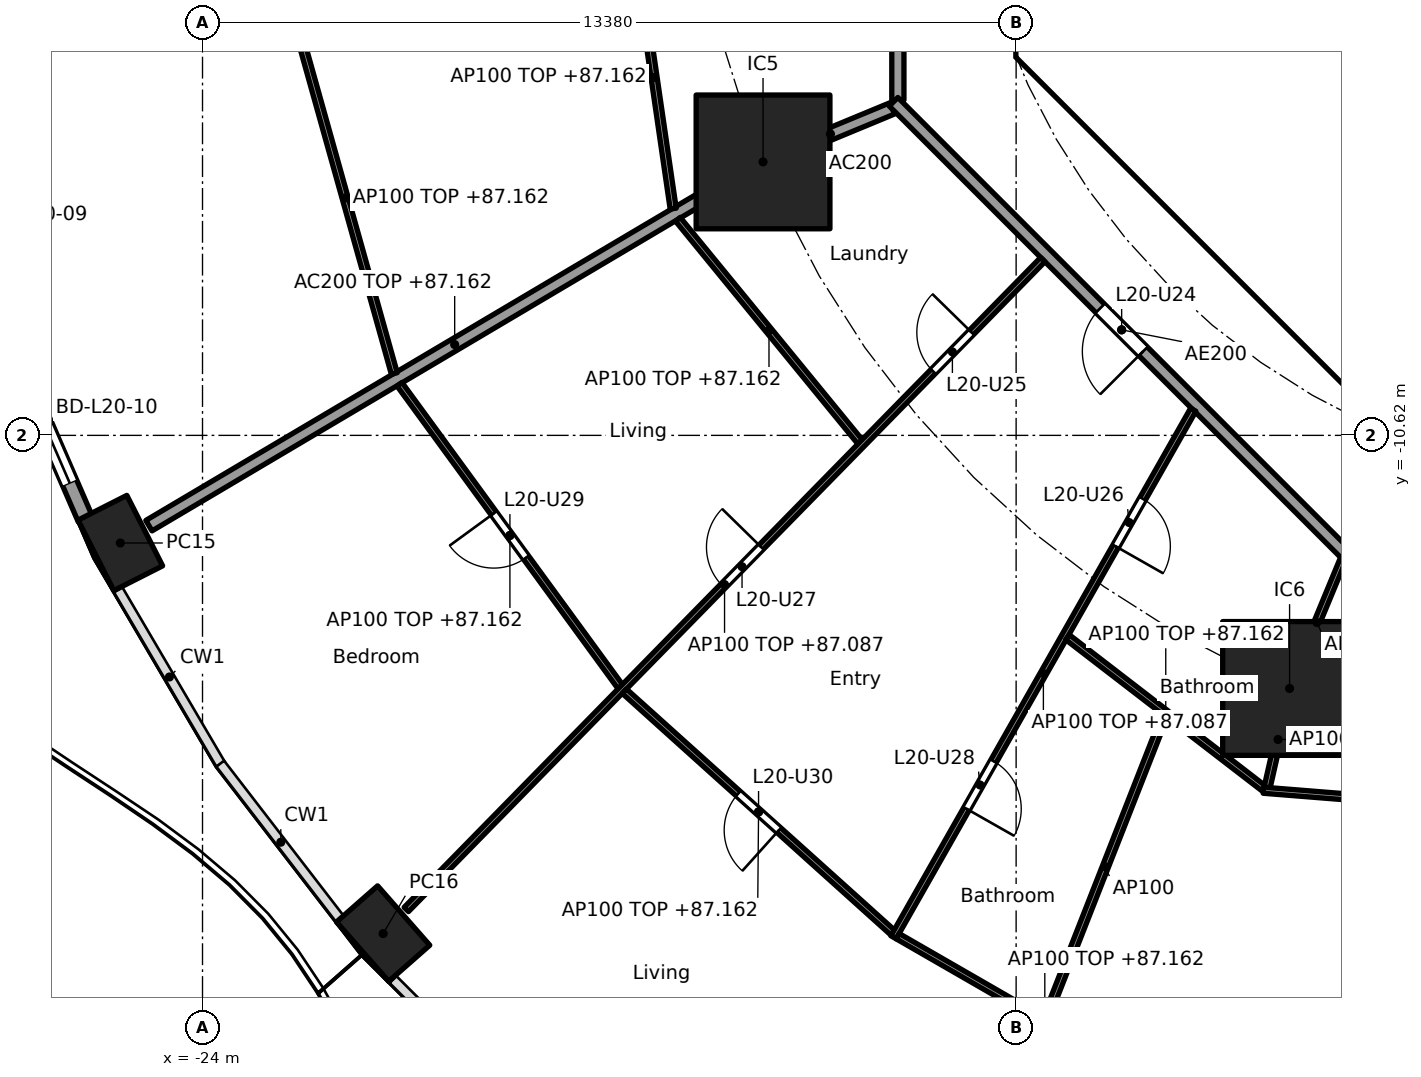
"""IFC4 building model, lengths in metres.
Left out: names, types, materials, properties, quantities, classifications, styles, units other than length and angle.
Written with IfcOpenShell. Run it as: python <this file> out.ifc"""

import sys

from ifc_helpers import new_model, si_unit, direction, frame, frame_2d, origin, origin_2d, place, context, subcontext, project, spatial, polyline, rectangle, hollow_rectangle, outline, extrude, element, fill, save


model = new_model("IFC4")
c1 = context("Model", 3, precision=1e-05, world=origin(), true_north=direction((0.0, 1.0)))
c2 = subcontext(c1, "Body", "Model", "MODEL_VIEW")
j1 = project(units=[si_unit("LENGTHUNIT", "METRE"), si_unit("PLANEANGLEUNIT", "RADIAN")], contexts=[c1])
p1 = place(None, origin())
s1 = spatial("IfcSite", under=j1, at=p1, CompositionType="ELEMENT")
p2 = place(p1, origin())
s2 = spatial("IfcBuilding", under=s1, at=p2, CompositionType="ELEMENT")
p3 = place(p2, frame((0.0, 0.0, 84.4)))
s3 = spatial("IfcBuildingStorey", under=s2, at=p3, CompositionType="ELEMENT", Elevation=84.4)
for number, where, z_axis, x_axis in (
    (1, (-25.352, -12.39, 0.0), (0.0, 0.0, 1.0), (0.452, -0.892, 0.0)),
    (2, (-21.03, -18.813, 0.0), (0.0, 0.0, 1.0), (0.66, -0.751, 0.0)),
):
    element("IfcColumn", number, at=place(p3, frame(where, z_axis=z_axis, x_axis=x_axis)), inside=s3, PredefinedType="COLUMN", context=c2, shape_type="SweptSolid", body=[
        extrude(hollow_rectangle(XDim=1.3, YDim=0.9, WallThickness=0.045, at=origin_2d()), origin(), (0.0, 0.0, 1.0), 3.7),
    ])
for number, where, z_axis, x_axis in (
    (3, (-14.782, -6.123, 0.0), (0.0, 0.0, 1.0), (1.0, 0.0, 0.0)),
    (4, (-6.123, -14.782, 0.0), (0.0, 0.0, 1.0), (1.0, 0.0, 0.0)),
):
    element("IfcColumn", number, at=place(p3, frame(where, z_axis=z_axis, x_axis=x_axis)), inside=s3, PredefinedType="COLUMN", context=c2, shape_type="SweptSolid", body=[
        extrude(rectangle(XDim=2.2, YDim=2.2, at=origin_2d()), origin(), (0.0, 0.0, 1.0), 3.7),
    ])
p4 = place(p3, frame((-25.928, -11.994, 0.0), z_axis=(0.0, 0.0, 1.0), x_axis=(-0.397682447205, 0.917523117521, 0.0)))
e5 = element("IfcWall", 5, at=p4, inside=s3, PredefinedType="SOLIDWALL", context=c2, shape_type="SweptSolid", body=[
    extrude(rectangle(XDim=3.38, YDim=0.25, at=frame_2d((1.69, 0.0))), origin(), (0.0, 0.0, 1.0), 3.44),
])
p5 = place(p4, frame((0.64, 0.0, 0.0)))
e6 = element("IfcOpeningElement", 6, at=p5, cuts=e5, PredefinedType="OPENING", context=c2, shape_type="SweptSolid", body=[
    extrude(rectangle(XDim=2.1, YDim=2.4, at=frame_2d((1.05, 1.2))), frame((0.0, 0.135, 0.0), z_axis=(0.0, -1.0, 0.0), x_axis=(1.0, 0.0, 0.0)), (0.0, 0.0, 1.0), 0.27),
])
p6 = place(p3, frame((-9.988, -4.613, 0.0), z_axis=(0.0, 0.0, 1.0), x_axis=(0.707106781187, -0.707106781187, 0.0)))
e7 = element("IfcWall", 7, at=p6, inside=s3, PredefinedType="SHEAR", context=c2, shape_type="SweptSolid", body=[
    extrude(rectangle(XDim=7.602, YDim=0.6, at=frame_2d((3.801, 0.0))), origin(), (0.0, 0.0, 1.0), 3.44),
])
p7 = place(p6, frame((6.151, 0.0, 0.0)))
e8 = element("IfcOpeningElement", 8, at=p7, cuts=e7, PredefinedType="OPENING", context=c2, shape_type="SweptSolid", body=[
    extrude(rectangle(XDim=1.1, YDim=2.1, at=frame_2d((0.55, 1.05))), frame((0.0, 0.31, 0.0), z_axis=(0.0, -1.0, 0.0), x_axis=(1.0, 0.0, 0.0)), (0.0, 0.0, 1.0), 0.62),
])
p8 = place(p3, frame((-6.2, -7.827, 0.0), z_axis=(0.0, 0.0, 1.0), x_axis=(0.0, 1.0, 0.0)))
e9 = element("IfcWall", 9, at=p8, inside=s3, PredefinedType="PARTITIONING", context=c2, shape_type="SweptSolid", body=[
    extrude(rectangle(XDim=3.527, YDim=0.15, at=frame_2d((1.763, 0.0))), origin(), (0.0, 0.0, 1.0), 3.44),
])
p9 = place(p8, frame((2.365, 0.0, 0.0)))
e10 = element("IfcOpeningElement", 10, at=p9, cuts=e9, PredefinedType="OPENING", context=c2, shape_type="SweptSolid", body=[
    extrude(rectangle(XDim=0.9, YDim=2.1, at=frame_2d((0.45, 1.05))), frame((0.0, 0.085, 0.0), z_axis=(0.0, -1.0, 0.0), x_axis=(1.0, 0.0, 0.0)), (0.0, 0.0, 1.0), 0.17),
])
p10 = place(p8, frame((0.489, 0.0, 0.0)))
e11 = element("IfcOpeningElement", 11, at=p10, cuts=e9, PredefinedType="OPENING", context=c2, shape_type="SweptSolid", body=[
    extrude(rectangle(XDim=0.9, YDim=2.1, at=frame_2d((0.45, 1.05))), frame((0.0, 0.085, 0.0), z_axis=(0.0, -1.0, 0.0), x_axis=(1.0, 0.0, 0.0)), (0.0, 0.0, 1.0), 0.17),
])
p11 = place(p3, origin())
e12 = element("IfcWall", 12, at=p11, inside=s3, PredefinedType="SHEAR", context=c2, shape_type="SweptSolid", body=[
    extrude(outline(polyline([(-10.625, -3.801), (-10.025, -3.801), (-10.025, -4.152), (-9.776, -4.401), (-10.2, -4.825), (-10.625, -4.401), (-10.625, -3.801)])), origin(), (0.0, 0.0, 1.0), 3.44),
])
p12 = place(p3, frame((-8.301, -5.8, 0.0), z_axis=(0.0, 0.0, 1.0), x_axis=(1.0, 0.0, 0.0)))
e13 = element("IfcWall", 13, at=p12, inside=s3, PredefinedType="PARTITIONING", context=c2, shape_type="SweptSolid", body=[
    extrude(rectangle(XDim=2.026, YDim=0.15, at=frame_2d((1.013, 0.0))), origin(), (0.0, 0.0, 1.0), 3.44),
])
p13 = place(p3, frame((-12.657, -5.243, 0.0), z_axis=(0.0, 0.0, 1.0), x_axis=(-0.923876145736, -0.382691608661, 0.0)))
e14 = element("IfcWall", 14, at=p13, inside=s3, PredefinedType="PARTITIONING", context=c2, shape_type="SweptSolid", body=[
    extrude(rectangle(XDim=2.2, YDim=0.2, at=frame_2d((1.1, 0.0))), origin(), (0.0, 0.0, 1.0), 3.44),
])
p14 = place(p3, frame((-14.825, -6.148, 0.0), z_axis=(0.0, 0.0, 1.0), x_axis=(-0.860400431487, -0.509618580408, 0.0)))
e15 = element("IfcWall", 15, at=p14, inside=s3, PredefinedType="PARTITIONING", context=c2, shape_type="SweptSolid", body=[
    extrude(rectangle(XDim=11.688, YDim=0.2, at=frame_2d((5.844, 0.0))), origin(), (0.0, 0.0, 1.0), 2.762),
])
p15 = place(p3, frame((-12.565, 5.304, 0.0), z_axis=(0.0, 0.0, 1.0), x_axis=(0.0, -1.0, 0.0)))
e16 = element("IfcWall", 16, at=p15, inside=s3, PredefinedType="PARTITIONING", context=c2, shape_type="SweptSolid", body=[
    extrude(rectangle(XDim=10.409, YDim=0.2, at=frame_2d((5.205, 0.0))), origin(), (0.0, 0.0, 1.0), 3.44),
])
p16 = place(p15, frame((3.07, 0.0, 0.0)))
e17 = element("IfcOpeningElement", 17, at=p16, cuts=e16, PredefinedType="OPENING", context=c2, shape_type="SweptSolid", body=[
    extrude(rectangle(XDim=1.0, YDim=2.1, at=frame_2d((0.5, 1.05))), frame((0.0, 0.11, 0.0), z_axis=(0.0, -1.0, 0.0), x_axis=(1.0, 0.0, 0.0)), (0.0, 0.0, 1.0), 0.22),
])
p17 = place(p3, frame((-12.635, -5.134, 0.0), z_axis=(0.0, 0.0, 1.0), x_axis=(0.707106781187, -0.707106781187, 0.0)))
e18 = element("IfcWall", 18, at=p17, inside=s3, PredefinedType="PARTITIONING", context=c2, shape_type="SweptSolid", body=[
    extrude(rectangle(XDim=10.609, YDim=0.2, at=frame_2d((5.305, 0.0))), origin(), (0.0, 0.0, 1.0), 3.44),
])
p18 = place(p17, frame((4.804, 0.0, 0.0)))
e19 = element("IfcOpeningElement", 19, at=p18, cuts=e18, PredefinedType="OPENING", context=c2, shape_type="SweptSolid", body=[
    extrude(rectangle(XDim=1.0, YDim=2.1, at=frame_2d((0.5, 1.05))), frame((0.0, 0.11, 0.0), z_axis=(0.0, -1.0, 0.0), x_axis=(1.0, 0.0, 0.0)), (0.0, 0.0, 1.0), 0.22),
])
p19 = place(p3, frame((-16.888, -2.577, 0.0), z_axis=(0.0, 0.0, 1.0), x_axis=(0.144228053649, -0.989544475272, 0.0)))
e20 = element("IfcWall", 20, at=p19, inside=s3, PredefinedType="PARTITIONING", context=c2, shape_type="SweptSolid", body=[
    extrude(rectangle(XDim=4.359, YDim=0.1, at=frame_2d((2.179, 0.0))), origin(), (0.0, 0.0, 1.0), 2.762),
])
p20 = place(p3, frame((-22.463, -3.832, 0.0), z_axis=(0.0, 0.0, 1.0), x_axis=(0.269805201578, -0.962914925215, 0.0)))
e21 = element("IfcWall", 21, at=p20, inside=s3, PredefinedType="PARTITIONING", context=c2, shape_type="SweptSolid", body=[
    extrude(rectangle(XDim=5.993, YDim=0.1, at=frame_2d((2.997, 0.0))), origin(), (0.0, 0.0, 1.0), 2.762),
])
p21 = place(p3, frame((-16.182, -7.067, 0.0), z_axis=(0.0, 0.0, 1.0), x_axis=(0.633400832951, -0.773823871962, 0.0)))
e22 = element("IfcWall", 22, at=p21, inside=s3, PredefinedType="PARTITIONING", context=c2, shape_type="SweptSolid", body=[
    extrude(rectangle(XDim=4.729, YDim=0.1, at=frame_2d((2.365, 0.0))), origin(), (0.0, 0.0, 1.0), 2.762),
])
p22 = place(p3, frame((-20.76, -9.779, 0.0), z_axis=(0.0, 0.0, 1.0), x_axis=(0.589597019189, -0.807697564045, 0.0)))
e23 = element("IfcWall", 23, at=p22, inside=s3, PredefinedType="PARTITIONING", context=c2, shape_type="SweptSolid", body=[
    extrude(rectangle(XDim=6.158, YDim=0.1, at=frame_2d((3.079, 0.0))), origin(), (0.0, 0.0, 1.0), 2.762),
])
p23 = place(p22, frame((2.629, 0.0, 0.0)))
e24 = element("IfcOpeningElement", 24, at=p23, cuts=e23, PredefinedType="OPENING", context=c2, shape_type="SweptSolid", body=[
    extrude(rectangle(XDim=0.9, YDim=2.1, at=frame_2d((0.45, 1.05))), frame((0.0, 0.06, 0.0), z_axis=(0.0, -1.0, 0.0), x_axis=(1.0, 0.0, 0.0)), (0.0, 0.0, 1.0), 0.12),
])
p24 = place(p3, frame((-10.181, -7.729, 0.0), z_axis=(0.0, 0.0, 1.0), x_axis=(-0.699708106083, -0.714428839201, 0.0)))
e25 = element("IfcWall", 25, at=p24, inside=s3, PredefinedType="PARTITIONING", context=c2, shape_type="SweptSolid", body=[
    extrude(rectangle(XDim=14.959, YDim=0.1, at=frame_2d((7.48, 0.0))), origin(), (0.0, 0.0, 1.0), 2.687),
])
p25 = place(p24, frame((1.675, 0.0, 0.0)))
e26 = element("IfcOpeningElement", 26, at=p25, cuts=e25, PredefinedType="OPENING", context=c2, shape_type="SweptSolid", body=[
    extrude(rectangle(XDim=0.9, YDim=2.1, at=frame_2d((0.45, 1.05))), frame((0.0, 0.06, 0.0), z_axis=(0.0, -1.0, 0.0), x_axis=(1.0, 0.0, 0.0)), (0.0, 0.0, 1.0), 0.12),
])
p26 = place(p24, frame((6.619, 0.0, 0.0)))
e27 = element("IfcOpeningElement", 27, at=p26, cuts=e25, PredefinedType="OPENING", context=c2, shape_type="SweptSolid", body=[
    extrude(rectangle(XDim=0.9, YDim=2.1, at=frame_2d((0.45, 1.05))), frame((0.0, 0.06, 0.0), z_axis=(0.0, -1.0, 0.0), x_axis=(1.0, 0.0, 0.0)), (0.0, 0.0, 1.0), 0.12),
])
p27 = place(p3, frame((-17.063, -14.827, 0.0), z_axis=(0.0, 0.0, 1.0), x_axis=(0.743478142868, -0.668760234373, 0.0)))
e28 = element("IfcWall", 28, at=p27, inside=s3, PredefinedType="PARTITIONING", context=c2, shape_type="SweptSolid", body=[
    extrude(rectangle(XDim=5.937, YDim=0.1, at=frame_2d((2.969, 0.0))), origin(), (0.0, 0.0, 1.0), 2.762),
])
p28 = place(p27, frame((2.519, 0.0, 0.0)))
e29 = element("IfcOpeningElement", 29, at=p28, cuts=e28, PredefinedType="OPENING", context=c2, shape_type="SweptSolid", body=[
    extrude(rectangle(XDim=0.9, YDim=2.1, at=frame_2d((0.45, 1.05))), frame((0.0, 0.06, 0.0), z_axis=(0.0, -1.0, 0.0), x_axis=(1.0, 0.0, 0.0)), (0.0, 0.0, 1.0), 0.12),
])
p29 = place(p3, frame((-7.707, -10.198, 0.0), z_axis=(0.0, 0.0, 1.0), x_axis=(-0.493963587489, -0.869482589955, 0.0)))
e30 = element("IfcWall", 30, at=p29, inside=s3, PredefinedType="PARTITIONING", context=c2, shape_type="SweptSolid", body=[
    extrude(rectangle(XDim=9.978, YDim=0.1, at=frame_2d((4.989, 0.0))), origin(), (0.0, 0.0, 1.0), 2.687),
])
p30 = place(p29, frame((1.684, 0.0, 0.0)))
e31 = element("IfcOpeningElement", 31, at=p30, cuts=e30, PredefinedType="OPENING", context=c2, shape_type="SweptSolid", body=[
    extrude(rectangle(XDim=0.9, YDim=2.1, at=frame_2d((0.45, 1.05))), frame((0.0, 0.06, 0.0), z_axis=(0.0, -1.0, 0.0), x_axis=(1.0, 0.0, 0.0)), (0.0, 0.0, 1.0), 0.12),
])
p31 = place(p29, frame((6.648, 0.0, 0.0)))
e32 = element("IfcOpeningElement", 32, at=p31, cuts=e30, PredefinedType="OPENING", context=c2, shape_type="SweptSolid", body=[
    extrude(rectangle(XDim=0.9, YDim=2.1, at=frame_2d((0.45, 1.05))), frame((0.0, 0.06, 0.0), z_axis=(0.0, -1.0, 0.0), x_axis=(1.0, 0.0, 0.0)), (0.0, 0.0, 1.0), 0.12),
])
p32 = place(p3, frame((-9.775, -13.939, 0.0), z_axis=(0.0, 0.0, 1.0), x_axis=(0.792156642473, -0.61031783014, 0.0)))
e33 = element("IfcWall", 33, at=p32, inside=s3, PredefinedType="PARTITIONING", context=c2, shape_type="SweptSolid", body=[
    extrude(rectangle(XDim=4.08, YDim=0.1, at=frame_2d((2.04, 0.0))), origin(), (0.0, 0.0, 1.0), 2.762),
])
p33 = place(p3, frame((-12.568, -18.856, 0.0), z_axis=(0.0, 0.0, 1.0), x_axis=(0.866532513598, -0.499120629585, 0.0)))
e34 = element("IfcWall", 34, at=p33, inside=s3, PredefinedType="PARTITIONING", context=c2, shape_type="SweptSolid", body=[
    extrude(rectangle(XDim=5.585, YDim=0.1, at=frame_2d((2.792, 0.0))), origin(), (0.0, 0.0, 1.0), 2.762),
])
p34 = place(p33, frame((3.739, 0.0, 0.0)))
e35 = element("IfcOpeningElement", 35, at=p34, cuts=e34, PredefinedType="OPENING", context=c2, shape_type="SweptSolid", body=[
    extrude(rectangle(XDim=0.9, YDim=2.1, at=frame_2d((0.45, 1.05))), frame((0.0, 0.06, 0.0), z_axis=(0.0, -1.0, 0.0), x_axis=(1.0, 0.0, 0.0)), (0.0, 0.0, 1.0), 0.12),
])
p35 = place(p3, frame((-8.177, -15.231, 0.0), z_axis=(0.0, 0.0, 1.0), x_axis=(-0.365520869553, -0.930803144559, 0.0)))
e36 = element("IfcWall", 36, at=p35, inside=s3, PredefinedType="PARTITIONING", context=c2, shape_type="SweptSolid", body=[
    extrude(rectangle(XDim=5.342, YDim=0.1, at=frame_2d((2.671, 0.0))), origin(), (0.0, 0.0, 1.0), 3.44),
])
p36 = place(p3, frame((-5.243, -12.657, 0.0), z_axis=(0.0, 0.0, 1.0), x_axis=(-0.382719158442, -0.923864733477, 0.0)))
e37 = element("IfcWall", 37, at=p36, inside=s3, PredefinedType="PARTITIONING", context=c2, shape_type="SweptSolid", body=[
    extrude(rectangle(XDim=2.25, YDim=0.1, at=frame_2d((1.125, 0.0))), origin(), (0.0, 0.0, 1.0), 3.44),
])
p37 = place(p3, frame((-6.134, -14.831, 0.0), z_axis=(0.0, 0.0, 1.0), x_axis=(-0.221269290858, -0.975212746493, 0.0)))
e38 = element("IfcWall", 38, at=p37, inside=s3, PredefinedType="PARTITIONING", context=c2, shape_type="SweptSolid", body=[
    extrude(rectangle(XDim=1.62, YDim=0.1, at=frame_2d((0.81, 0.0))), origin(), (0.0, 0.0, 1.0), 3.44),
])
p38 = place(p3, frame((-6.553, -16.456, 0.0), z_axis=(0.0, 0.0, 1.0), x_axis=(0.996817033118, -0.079723286975, 0.0)))
e39 = element("IfcWall", 39, at=p38, inside=s3, PredefinedType="PARTITIONING", context=c2, shape_type="SweptSolid", body=[
    extrude(rectangle(XDim=4.866, YDim=0.1, at=frame_2d((2.433, 0.0))), origin(), (0.0, 0.0, 1.0), 2.762),
])
p39 = place(p38, frame((1.983, 0.0, 0.0)))
e40 = element("IfcOpeningElement", 40, at=p39, cuts=e39, PredefinedType="OPENING", context=c2, shape_type="SweptSolid", body=[
    extrude(rectangle(XDim=0.9, YDim=2.1, at=frame_2d((0.45, 1.05))), frame((0.0, 0.06, 0.0), z_axis=(0.0, -1.0, 0.0), x_axis=(1.0, 0.0, 0.0)), (0.0, 0.0, 1.0), 0.12),
])
p40 = place(p5, origin())
e41 = element("IfcDoor", 41, at=p40, inside=s3, OperationType="SLIDING_TO_LEFT", PredefinedType="DOOR", context=c2, shape_type="SweptSolid", body=[
    extrude(rectangle(XDim=2.1, YDim=2.4, at=frame_2d((1.05, 1.2))), frame((0.0, 0.025, 0.0), z_axis=(0.0, -1.0, 0.0), x_axis=(1.0, 0.0, 0.0)), (0.0, 0.0, 1.0), 0.05),
])
fill(e6, e41)
p41 = place(p9, origin())
e42 = element("IfcDoor", 42, at=p41, inside=s3, OperationType="SINGLE_SWING_LEFT", PredefinedType="DOOR", context=c2, shape_type="SweptSolid", body=[
    extrude(rectangle(XDim=0.9, YDim=2.1, at=frame_2d((0.45, 1.05))), frame((0.0, 0.025, 0.0), z_axis=(0.0, -1.0, 0.0), x_axis=(1.0, 0.0, 0.0)), (0.0, 0.0, 1.0), 0.05),
])
fill(e10, e42)
p42 = place(p10, origin())
e43 = element("IfcDoor", 43, at=p42, inside=s3, OperationType="SINGLE_SWING_LEFT", PredefinedType="DOOR", context=c2, shape_type="SweptSolid", body=[
    extrude(rectangle(XDim=0.9, YDim=2.1, at=frame_2d((0.45, 1.05))), frame((0.0, 0.025, 0.0), z_axis=(0.0, -1.0, 0.0), x_axis=(1.0, 0.0, 0.0)), (0.0, 0.0, 1.0), 0.05),
])
fill(e11, e43)
p43 = place(p7, origin())
e44 = element("IfcDoor", 44, at=p43, inside=s3, OperationType="SINGLE_SWING_LEFT", PredefinedType="DOOR", context=c2, shape_type="SweptSolid", body=[
    extrude(rectangle(XDim=1.1, YDim=2.1, at=frame_2d((0.55, 1.05))), frame((0.0, 0.025, 0.0), z_axis=(0.0, -1.0, 0.0), x_axis=(1.0, 0.0, 0.0)), (0.0, 0.0, 1.0), 0.05),
])
fill(e8, e44)
p44 = place(p18, frame((1.0, 0.0, 0.0), x_axis=(-1.0, 0.0, 0.0)))
e45 = element("IfcDoor", 45, at=p44, inside=s3, OperationType="SINGLE_SWING_LEFT", PredefinedType="DOOR", context=c2, shape_type="SweptSolid", body=[
    extrude(rectangle(XDim=1.0, YDim=2.1, at=frame_2d((0.5, 1.05))), frame((0.0, 0.025, 0.0), z_axis=(0.0, -1.0, 0.0), x_axis=(1.0, 0.0, 0.0)), (0.0, 0.0, 1.0), 0.05),
])
fill(e19, e45)
p45 = place(p25, frame((0.9, 0.0, 0.0), x_axis=(-1.0, 0.0, 0.0)))
e46 = element("IfcDoor", 46, at=p45, inside=s3, OperationType="SINGLE_SWING_RIGHT", PredefinedType="DOOR", context=c2, shape_type="SweptSolid", body=[
    extrude(rectangle(XDim=0.9, YDim=2.1, at=frame_2d((0.45, 1.05))), frame((0.0, 0.025, 0.0), z_axis=(0.0, -1.0, 0.0), x_axis=(1.0, 0.0, 0.0)), (0.0, 0.0, 1.0), 0.05),
])
fill(e26, e46)
p46 = place(p30, origin())
e47 = element("IfcDoor", 47, at=p46, inside=s3, OperationType="SINGLE_SWING_RIGHT", PredefinedType="DOOR", context=c2, shape_type="SweptSolid", body=[
    extrude(rectangle(XDim=0.9, YDim=2.1, at=frame_2d((0.45, 1.05))), frame((0.0, 0.025, 0.0), z_axis=(0.0, -1.0, 0.0), x_axis=(1.0, 0.0, 0.0)), (0.0, 0.0, 1.0), 0.05),
])
fill(e31, e47)
p47 = place(p26, frame((0.9, 0.0, 0.0), x_axis=(-1.0, 0.0, 0.0)))
e48 = element("IfcDoor", 48, at=p47, inside=s3, OperationType="SINGLE_SWING_RIGHT", PredefinedType="DOOR", context=c2, shape_type="SweptSolid", body=[
    extrude(rectangle(XDim=0.9, YDim=2.1, at=frame_2d((0.45, 1.05))), frame((0.0, 0.025, 0.0), z_axis=(0.0, -1.0, 0.0), x_axis=(1.0, 0.0, 0.0)), (0.0, 0.0, 1.0), 0.05),
])
fill(e27, e48)
p48 = place(p31, origin())
e49 = element("IfcDoor", 49, at=p48, inside=s3, OperationType="SINGLE_SWING_RIGHT", PredefinedType="DOOR", context=c2, shape_type="SweptSolid", body=[
    extrude(rectangle(XDim=0.9, YDim=2.1, at=frame_2d((0.45, 1.05))), frame((0.0, 0.025, 0.0), z_axis=(0.0, -1.0, 0.0), x_axis=(1.0, 0.0, 0.0)), (0.0, 0.0, 1.0), 0.05),
])
fill(e32, e49)
p49 = place(p23, frame((0.9, 0.0, 0.0), x_axis=(-1.0, 0.0, 0.0)))
e50 = element("IfcDoor", 50, at=p49, inside=s3, OperationType="SINGLE_SWING_RIGHT", PredefinedType="DOOR", context=c2, shape_type="SweptSolid", body=[
    extrude(rectangle(XDim=0.9, YDim=2.1, at=frame_2d((0.45, 1.05))), frame((0.0, 0.025, 0.0), z_axis=(0.0, -1.0, 0.0), x_axis=(1.0, 0.0, 0.0)), (0.0, 0.0, 1.0), 0.05),
])
fill(e24, e50)
p50 = place(p28, frame((0.9, 0.0, 0.0), x_axis=(-1.0, 0.0, 0.0)))
e51 = element("IfcDoor", 51, at=p50, inside=s3, OperationType="SINGLE_SWING_LEFT", PredefinedType="DOOR", context=c2, shape_type="SweptSolid", body=[
    extrude(rectangle(XDim=0.9, YDim=2.1, at=frame_2d((0.45, 1.05))), frame((0.0, 0.025, 0.0), z_axis=(0.0, -1.0, 0.0), x_axis=(1.0, 0.0, 0.0)), (0.0, 0.0, 1.0), 0.05),
])
fill(e29, e51)
save(model, sys.argv[1])
